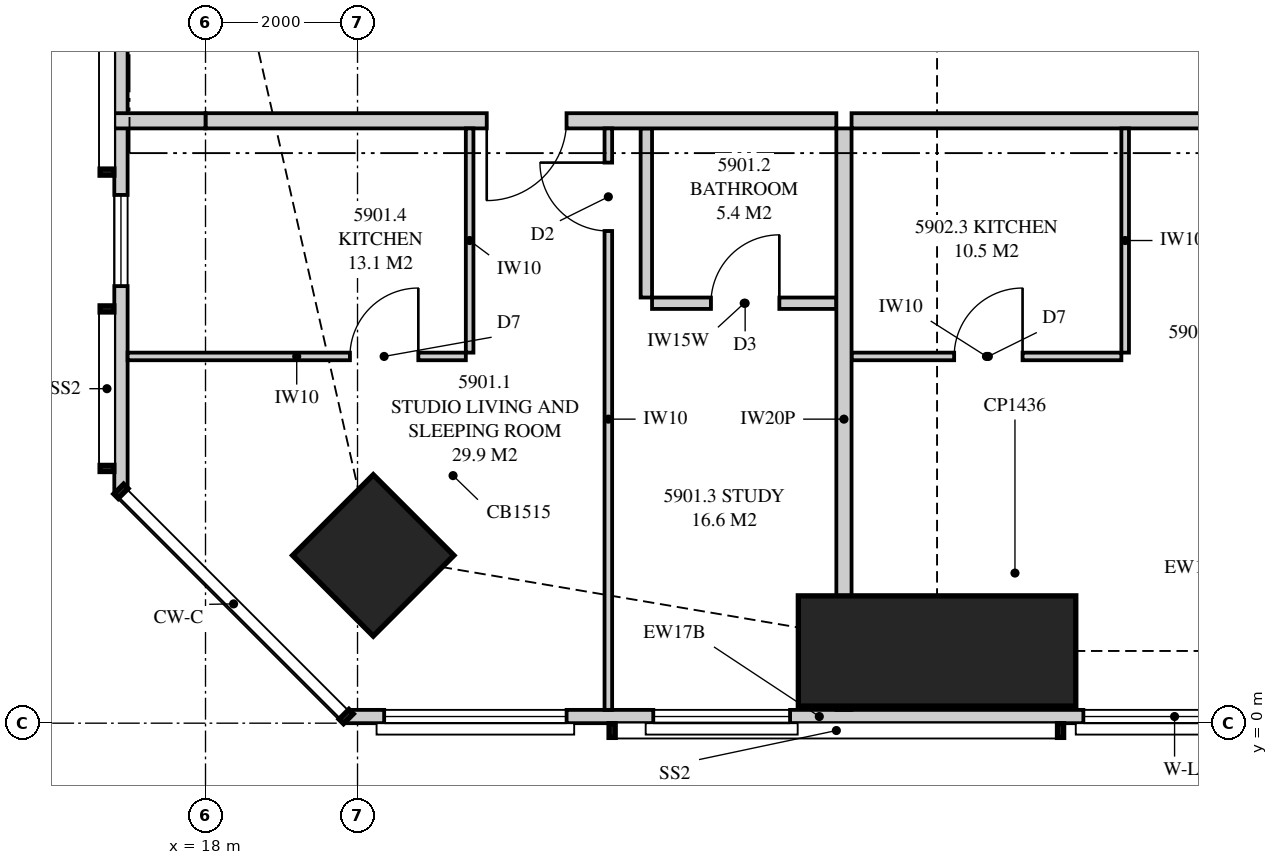
"""IFC4 building model, lengths in metres.
Left out: names, types, materials, properties, quantities, classifications, styles, units other than length and angle.
Written with IfcOpenShell. Run it as: python <this file> out.ifc"""

import sys

from ifc_helpers import new_model, si_unit, direction, frame, frame_2d, origin, origin_2d, place, context, subcontext, project, spatial, polyline, rectangle, hollow_rectangle, outline, extrude, element, fill, save


model = new_model("IFC4")
c1 = context("Model", 3, precision=1e-05, world=origin(), true_north=direction((0.0, 1.0)))
c2 = subcontext(c1, "Body", "Model", "MODEL_VIEW")
j1 = project(units=[si_unit("LENGTHUNIT", "METRE"), si_unit("PLANEANGLEUNIT", "RADIAN")], contexts=[c1])
p1 = place(None, origin())
s1 = spatial("IfcSite", under=j1, at=p1, CompositionType="ELEMENT")
p2 = place(p1, origin())
s2 = spatial("IfcBuilding", under=s1, at=p2, CompositionType="ELEMENT")
p3 = place(p2, frame((0.0, 0.0, 217.95)))
s3 = spatial("IfcBuildingStorey", under=s2, at=p3, CompositionType="ELEMENT", Elevation=217.95)
p4 = place(p3, frame((20.207, 2.207, 0.0), z_axis=(0.0, 0.0, 1.0), x_axis=(0.707106781187, 0.707106781187, 0.0)))
e1 = element("IfcColumn", 1, at=p4, inside=s3, PredefinedType="COLUMN", context=c2, shape_type="SweptSolid", body=[
    extrude(hollow_rectangle(XDim=1.5, YDim=1.5, WallThickness=0.125, at=origin_2d()), origin(), (0.0, 0.0, 1.0), 3.5),
])
p5 = place(p3, frame((27.625, 0.95, 0.0), z_axis=(0.0, 0.0, 1.0), x_axis=(0.0, 1.0, 0.0)))
e2 = element("IfcColumn", 2, at=p5, inside=s3, PredefinedType="COLUMN", context=c2, shape_type="SweptSolid", body=[
    extrude(rectangle(XDim=1.45, YDim=3.65, at=origin_2d()), origin(), (0.0, 0.0, 1.0), 3.5),
])
p6 = place(p3, frame((19.851, 0.087, 0.0), z_axis=(0.0, 0.0, 1.0), x_axis=(1.0, 0.0, 0.0)))
e3 = element("IfcWall", 3, at=p6, inside=s3, PredefinedType="SOLIDWALL", context=c2, shape_type="SweptSolid", body=[
    extrude(outline(polyline([(0.0, 0.0), (12.449, 0.0), (12.449, 2.3), (7.774, 2.3), (7.774, 3.26), (7.642, 3.26), (7.642, 2.3), (7.559, 2.3), (7.559, 3.26), (0.0, 3.26), (0.0, 0.0)])), frame((0.0, 0.087, 0.0), z_axis=(0.0, -1.0, 0.0), x_axis=(1.0, 0.0, 0.0)), (0.0, 0.0, 1.0), 0.175),
])
p7 = place(p6, frame((0.5, 0.0, 0.4)))
e4 = element("IfcOpeningElement", 4, at=p7, cuts=e3, PredefinedType="OPENING", context=c2, shape_type="SweptSolid", body=[
    extrude(rectangle(XDim=2.4, YDim=1.85, at=frame_2d((1.2, 0.925))), frame((0.0, 0.097, 0.0), z_axis=(0.0, -1.0, 0.0), x_axis=(1.0, 0.0, 0.0)), (0.0, 0.0, 1.0), 0.195),
])
p8 = place(p6, frame((4.04, 0.0, 0.4)))
e5 = element("IfcOpeningElement", 5, at=p8, cuts=e3, PredefinedType="OPENING", context=c2, shape_type="SweptSolid", body=[
    extrude(rectangle(XDim=1.8, YDim=1.85, at=frame_2d((0.9, 0.925))), frame((0.0, 0.097, 0.0), z_axis=(0.0, -1.0, 0.0), x_axis=(1.0, 0.0, 0.0)), (0.0, 0.0, 1.0), 0.195),
])
p9 = place(p6, frame((9.699, 0.0, 0.4)))
e6 = element("IfcOpeningElement", 6, at=p9, cuts=e3, PredefinedType="OPENING", context=c2, shape_type="SweptSolid", body=[
    extrude(rectangle(XDim=2.4, YDim=1.85, at=frame_2d((1.2, 0.925))), frame((0.0, 0.097, 0.0), z_axis=(0.0, -1.0, 0.0), x_axis=(1.0, 0.0, 0.0)), (0.0, 0.0, 1.0), 0.195),
])
p10 = place(p3, frame((16.887, 30.949, 0.0), z_axis=(0.0, 0.0, 1.0), x_axis=(0.0, -1.0, 0.0)))
e7 = element("IfcWall", 7, at=p10, inside=s3, PredefinedType="SOLIDWALL", context=c2, shape_type="SweptSolid", body=[
    extrude(outline(polyline([(27.897, 0.0), (27.897, 3.26), (18.148, 3.26), (18.148, 2.3), (18.125, 2.3), (18.125, 3.26), (17.949, 3.26), (17.949, 2.3), (5.949, 2.3), (5.949, 3.26), (0.0, 3.26), (0.0, 0.0), (5.239, 0.0), (5.239, 0.013), (6.659, 0.013), (6.659, 0.0), (17.239, 0.0), (17.239, 0.013), (18.659, 0.013), (18.659, 0.0), (27.897, 0.0)])), frame((0.0, 0.087, 0.0), z_axis=(0.0, -1.0, 0.0), x_axis=(1.0, 0.0, 0.0)), (0.0, 0.0, 1.0), 0.175),
])
p11 = place(p10, frame((11.849, 0.0, 0.4)))
e8 = element("IfcOpeningElement", 8, at=p11, cuts=e7, PredefinedType="OPENING", context=c2, shape_type="SweptSolid", body=[
    extrude(rectangle(XDim=1.2, YDim=1.85, at=frame_2d((0.6, 0.925))), frame((0.0, 0.097, 0.0), z_axis=(0.0, -1.0, 0.0), x_axis=(1.0, 0.0, 0.0)), (0.0, 0.0, 1.0), 0.195),
])
p12 = place(p10, frame((23.999, 0.0, 0.4)))
e9 = element("IfcOpeningElement", 9, at=p12, cuts=e7, PredefinedType="OPENING", context=c2, shape_type="SweptSolid", body=[
    extrude(rectangle(XDim=1.2, YDim=1.85, at=frame_2d((0.6, 0.925))), frame((0.0, 0.097, 0.0), z_axis=(0.0, -1.0, 0.0), x_axis=(1.0, 0.0, 0.0)), (0.0, 0.0, 1.0), 0.195),
])
p13 = place(p3, frame((26.4, 0.175, 0.0), z_axis=(0.0, 0.0, 1.0), x_axis=(0.0, 1.0, 0.0)))
e10 = element("IfcWall", 10, at=p13, inside=s3, PredefinedType="PARTITIONING", context=c2, shape_type="SweptSolid", body=[
    extrude(outline(polyline([(0.06, 3.26), (0.0, 3.26), (0.0, 0.0), (0.529, 0.0), (0.529, 0.19), (1.021, 0.19), (1.021, 0.0), (7.65, 0.0), (7.65, 2.66), (1.906, 2.66), (1.906, 2.3), (1.021, 2.3), (1.021, 1.96), (0.529, 1.96), (0.529, 2.3), (0.06, 2.3), (0.06, 3.26)])), frame((0.0, 0.1, 0.0), z_axis=(0.0, -1.0, 0.0), x_axis=(1.0, 0.0, 0.0)), (0.0, 0.0, 1.0), 0.2),
])
p14 = place(p3, frame((18.0, 7.925, 0.0), z_axis=(0.0, 0.0, 1.0), x_axis=(1.0, 0.0, 0.0)))
e11 = element("IfcWall", 11, at=p14, inside=s3, PredefinedType="PARTITIONING", context=c2, shape_type="SweptSolid", body=[
    extrude(outline(polyline([(0.0, 0.0), (8.3, 0.0), (8.3, 3.26), (1.839, 3.26), (1.839, 2.3), (0.0, 2.3), (0.0, 3.26), (0.0, 0.0)])), frame((0.0, 0.1, 0.0), z_axis=(0.0, -1.0, 0.0), x_axis=(1.0, 0.0, 0.0)), (0.0, 0.0, 1.0), 0.2),
])
p15 = place(p14, frame((3.7, 0.0, 0.0)))
e12 = element("IfcOpeningElement", 12, at=p15, cuts=e11, PredefinedType="OPENING", context=c2, shape_type="SweptSolid", body=[
    extrude(rectangle(XDim=1.05, YDim=2.2, at=frame_2d((0.525, 1.1))), frame((0.0, 0.11, 0.0), z_axis=(0.0, -1.0, 0.0), x_axis=(1.0, 0.0, 0.0)), (0.0, 0.0, 1.0), 0.22),
])
p16 = place(p3, frame((23.875, 5.525, 0.0), z_axis=(0.0, 0.0, 1.0), x_axis=(1.0, 0.0, 0.0)))
e13 = element("IfcWall", 13, at=p16, inside=s3, PredefinedType="PLUMBINGWALL", context=c2, shape_type="SweptSolid", body=[
    extrude(rectangle(XDim=2.425, YDim=0.15, at=frame_2d((1.212, 0.0))), origin(), (0.0, 0.0, 1.0), 3.26),
])
p17 = place(p16, frame((0.775, 0.0, 0.0)))
e14 = element("IfcOpeningElement", 14, at=p17, cuts=e13, PredefinedType="OPENING", context=c2, shape_type="SweptSolid", body=[
    extrude(rectangle(XDim=0.9, YDim=2.1, at=frame_2d((0.45, 1.05))), frame((0.0, 0.085, 0.0), z_axis=(0.0, -1.0, 0.0), x_axis=(1.0, 0.0, 0.0)), (0.0, 0.0, 1.0), 0.17),
])
p18 = place(p3, frame((23.8, 5.6, 0.0), z_axis=(0.0, 0.0, 1.0), x_axis=(0.0, 1.0, 0.0)))
e15 = element("IfcWall", 15, at=p18, inside=s3, PredefinedType="PLUMBINGWALL", context=c2, shape_type="SweptSolid", body=[
    extrude(rectangle(XDim=2.225, YDim=0.15, at=frame_2d((1.112, 0.0))), origin(), (0.0, 0.0, 1.0), 3.26),
])
p19 = place(p3, frame((23.3, 0.175, 0.0), z_axis=(0.0, 0.0, 1.0), x_axis=(0.0, 1.0, 0.0)))
e16 = element("IfcWall", 16, at=p19, inside=s3, PredefinedType="PARTITIONING", context=c2, shape_type="SweptSolid", body=[
    extrude(outline(polyline([(0.0, 0.0), (7.65, 0.0), (7.65, 3.26), (2.38, 3.26), (2.38, 2.3), (0.636, 2.3), (0.636, 3.26), (0.0, 3.26), (0.0, 0.0)])), frame((0.0, 0.05, 0.0), z_axis=(0.0, -1.0, 0.0), x_axis=(1.0, 0.0, 0.0)), (0.0, 0.0, 1.0), 0.1),
])
p20 = place(p19, frame((6.3, 0.0, 0.0)))
e17 = element("IfcOpeningElement", 17, at=p20, cuts=e16, PredefinedType="OPENING", context=c2, shape_type="SweptSolid", body=[
    extrude(rectangle(XDim=0.9, YDim=2.1, at=frame_2d((0.45, 1.05))), frame((0.0, 0.06, 0.0), z_axis=(0.0, -1.0, 0.0), x_axis=(1.0, 0.0, 0.0)), (0.0, 0.0, 1.0), 0.12),
])
p21 = place(p3, frame((16.975, 4.825, 0.0), z_axis=(0.0, 0.0, 1.0), x_axis=(1.0, 0.0, 0.0)))
e18 = element("IfcWall", 18, at=p21, inside=s3, PredefinedType="PARTITIONING", context=c2, shape_type="SweptSolid", body=[
    extrude(outline(polyline([(0.0, 0.0), (4.45, 0.0), (4.45, 3.26), (3.518, 3.26), (3.518, 2.3), (1.754, 2.3), (1.754, 3.26), (0.0, 3.26), (0.0, 0.0)])), frame((0.0, 0.05, 0.0), z_axis=(0.0, -1.0, 0.0), x_axis=(1.0, 0.0, 0.0)), (0.0, 0.0, 1.0), 0.1),
])
p22 = place(p21, frame((2.925, 0.0, 0.0)))
e19 = element("IfcOpeningElement", 19, at=p22, cuts=e18, PredefinedType="OPENING", context=c2, shape_type="SweptSolid", body=[
    extrude(rectangle(XDim=0.9, YDim=2.1, at=frame_2d((0.45, 1.05))), frame((0.0, 0.06, 0.0), z_axis=(0.0, -1.0, 0.0), x_axis=(1.0, 0.0, 0.0)), (0.0, 0.0, 1.0), 0.12),
])
p23 = place(p3, frame((21.475, 4.875, 0.0), z_axis=(0.0, 0.0, 1.0), x_axis=(0.0, 1.0, 0.0)))
e20 = element("IfcWall", 20, at=p23, inside=s3, PredefinedType="PARTITIONING", context=c2, shape_type="SweptSolid", body=[
    extrude(rectangle(XDim=2.95, YDim=0.1, at=frame_2d((1.475, 0.0))), origin(), (0.0, 0.0, 1.0), 3.26),
])
p24 = place(p3, frame((26.5, 7.925, 0.0), z_axis=(0.0, 0.0, 1.0), x_axis=(1.0, 0.0, 0.0)))
e21 = element("IfcWall", 21, at=p24, inside=s3, PredefinedType="PARTITIONING", context=c2, shape_type="SweptSolid", body=[
    extrude(outline(polyline([(0.0, 0.0), (11.85, 0.0), (11.85, 3.26), (11.85, 2.66), (9.44, 2.66), (9.44, 3.26), (2.435, 3.26), (2.435, 2.66), (0.0, 2.66), (0.0, 3.26), (0.0, 0.0)])), frame((0.0, 0.1, 0.0), z_axis=(0.0, -1.0, 0.0), x_axis=(1.0, 0.0, 0.0)), (0.0, 0.0, 1.0), 0.2),
])
p25 = place(p24, frame((5.425, 0.0, 0.0)))
e22 = element("IfcOpeningElement", 22, at=p25, cuts=e21, PredefinedType="OPENING", context=c2, shape_type="SweptSolid", body=[
    extrude(rectangle(XDim=1.05, YDim=2.2, at=frame_2d((0.525, 1.1))), frame((0.0, 0.11, 0.0), z_axis=(0.0, -1.0, 0.0), x_axis=(1.0, 0.0, 0.0)), (0.0, 0.0, 1.0), 0.22),
])
p26 = place(p3, frame((26.5, 4.825, 0.0), z_axis=(0.0, 0.0, 1.0), x_axis=(1.0, 0.0, 0.0)))
e23 = element("IfcWall", 23, at=p26, inside=s3, PredefinedType="PARTITIONING", context=c2, shape_type="SweptSolid", body=[
    extrude(outline(polyline([(0.0, 0.0), (3.55, 0.0), (3.55, 3.26), (2.385, 3.26), (2.385, 2.66), (0.0, 2.66), (0.0, 3.26), (0.0, 0.0)])), frame((0.0, 0.05, 0.0), z_axis=(0.0, -1.0, 0.0), x_axis=(1.0, 0.0, 0.0)), (0.0, 0.0, 1.0), 0.1),
])
p27 = place(p26, frame((1.35, 0.0, 0.0)))
e24 = element("IfcOpeningElement", 24, at=p27, cuts=e23, PredefinedType="OPENING", context=c2, shape_type="SweptSolid", body=[
    extrude(rectangle(XDim=0.9, YDim=2.1, at=frame_2d((0.45, 1.05))), frame((0.0, 0.06, 0.0), z_axis=(0.0, -1.0, 0.0), x_axis=(1.0, 0.0, 0.0)), (0.0, 0.0, 1.0), 0.12),
])
p28 = place(p3, frame((30.1, 4.875, 0.0), z_axis=(0.0, 0.0, 1.0), x_axis=(0.0, 1.0, 0.0)))
e25 = element("IfcWall", 25, at=p28, inside=s3, PredefinedType="PARTITIONING", context=c2, shape_type="SweptSolid", body=[
    extrude(rectangle(XDim=2.95, YDim=0.1, at=frame_2d((1.475, 0.0))), origin(), (0.0, 0.0, 1.0), 3.26),
])
p29 = place(p3, frame((16.8, 7.925, 0.0), z_axis=(0.0, 0.0, 1.0), x_axis=(1.0, 0.0, 0.0)))
e26 = element("IfcWall", 26, at=p29, inside=s3, PredefinedType="PARTITIONING", context=c2, shape_type="SweptSolid", body=[
    extrude(outline(polyline([(0.0, 0.0), (1.2, 0.0), (1.2, 3.26), (1.2, 2.3), (1.172, 2.3), (1.172, 3.26), (0.0, 3.26), (0.0, 0.0)])), frame((0.0, 0.1, 0.0), z_axis=(0.0, -1.0, 0.0), x_axis=(1.0, 0.0, 0.0)), (0.0, 0.0, 1.0), 0.2),
])
p30 = place(p7, origin())
e27 = element("IfcWindow", 27, at=p30, inside=s3, PartitioningType="SINGLE_PANEL", PredefinedType="WINDOW", context=c2, shape_type="SweptSolid", body=[
    extrude(rectangle(XDim=2.4, YDim=1.85, at=frame_2d((1.2, 0.925))), frame((0.0, 0.03, 0.0), z_axis=(0.0, -1.0, 0.0), x_axis=(1.0, 0.0, 0.0)), (0.0, 0.0, 1.0), 0.06),
])
fill(e4, e27)
p31 = place(p8, origin())
e28 = element("IfcWindow", 28, at=p31, inside=s3, PartitioningType="SINGLE_PANEL", PredefinedType="WINDOW", context=c2, shape_type="SweptSolid", body=[
    extrude(rectangle(XDim=1.8, YDim=1.85, at=frame_2d((0.9, 0.925))), frame((0.0, 0.03, 0.0), z_axis=(0.0, -1.0, 0.0), x_axis=(1.0, 0.0, 0.0)), (0.0, 0.0, 1.0), 0.06),
])
fill(e5, e28)
p32 = place(p9, origin())
e29 = element("IfcWindow", 29, at=p32, inside=s3, PartitioningType="SINGLE_PANEL", PredefinedType="WINDOW", context=c2, shape_type="SweptSolid", body=[
    extrude(rectangle(XDim=2.4, YDim=1.85, at=frame_2d((1.2, 0.925))), frame((0.0, 0.03, 0.0), z_axis=(0.0, -1.0, 0.0), x_axis=(1.0, 0.0, 0.0)), (0.0, 0.0, 1.0), 0.06),
])
fill(e6, e29)
p33 = place(p12, origin())
e30 = element("IfcWindow", 30, at=p33, inside=s3, PartitioningType="SINGLE_PANEL", PredefinedType="WINDOW", context=c2, shape_type="SweptSolid", body=[
    extrude(rectangle(XDim=1.2, YDim=1.85, at=frame_2d((0.6, 0.925))), frame((0.0, 0.03, 0.0), z_axis=(0.0, -1.0, 0.0), x_axis=(1.0, 0.0, 0.0)), (0.0, 0.0, 1.0), 0.06),
])
fill(e9, e30)
p34 = place(p15, frame((1.05, 0.0, 0.0), z_axis=(0.0, 0.0, 1.0), x_axis=(-1.0, 0.0, 0.0)))
e31 = element("IfcDoor", 31, at=p34, inside=s3, OperationType="SINGLE_SWING_RIGHT", PredefinedType="DOOR", context=c2, shape_type="SweptSolid", body=[
    extrude(rectangle(XDim=1.05, YDim=2.2, at=frame_2d((0.525, 1.1))), frame((0.0, 0.025, 0.0), z_axis=(0.0, -1.0, 0.0), x_axis=(1.0, 0.0, 0.0)), (0.0, 0.0, 1.0), 0.05),
])
fill(e12, e31)
p35 = place(p17, origin())
e32 = element("IfcDoor", 32, at=p35, inside=s3, OperationType="SINGLE_SWING_RIGHT", PredefinedType="DOOR", context=c2, shape_type="SweptSolid", body=[
    extrude(rectangle(XDim=0.9, YDim=2.1, at=frame_2d((0.45, 1.05))), frame((0.0, 0.025, 0.0), z_axis=(0.0, -1.0, 0.0), x_axis=(1.0, 0.0, 0.0)), (0.0, 0.0, 1.0), 0.05),
])
fill(e14, e32)
p36 = place(p20, origin())
e33 = element("IfcDoor", 33, at=p36, inside=s3, OperationType="SINGLE_SWING_RIGHT", PredefinedType="DOOR", context=c2, shape_type="SweptSolid", body=[
    extrude(rectangle(XDim=0.9, YDim=2.1, at=frame_2d((0.45, 1.05))), frame((0.0, 0.025, 0.0), z_axis=(0.0, -1.0, 0.0), x_axis=(1.0, 0.0, 0.0)), (0.0, 0.0, 1.0), 0.05),
])
fill(e17, e33)
p37 = place(p22, origin())
e34 = element("IfcDoor", 34, at=p37, inside=s3, OperationType="SINGLE_SWING_RIGHT", PredefinedType="DOOR", context=c2, shape_type="SweptSolid", body=[
    extrude(rectangle(XDim=0.9, YDim=2.1, at=frame_2d((0.45, 1.05))), frame((0.0, 0.025, 0.0), z_axis=(0.0, -1.0, 0.0), x_axis=(1.0, 0.0, 0.0)), (0.0, 0.0, 1.0), 0.05),
])
fill(e19, e34)
p38 = place(p27, origin())
e35 = element("IfcDoor", 35, at=p38, inside=s3, OperationType="SINGLE_SWING_RIGHT", PredefinedType="DOOR", context=c2, shape_type="SweptSolid", body=[
    extrude(rectangle(XDim=0.9, YDim=2.1, at=frame_2d((0.45, 1.05))), frame((0.0, 0.025, 0.0), z_axis=(0.0, -1.0, 0.0), x_axis=(1.0, 0.0, 0.0)), (0.0, 0.0, 1.0), 0.05),
])
fill(e24, e35)
save(model, sys.argv[1])
